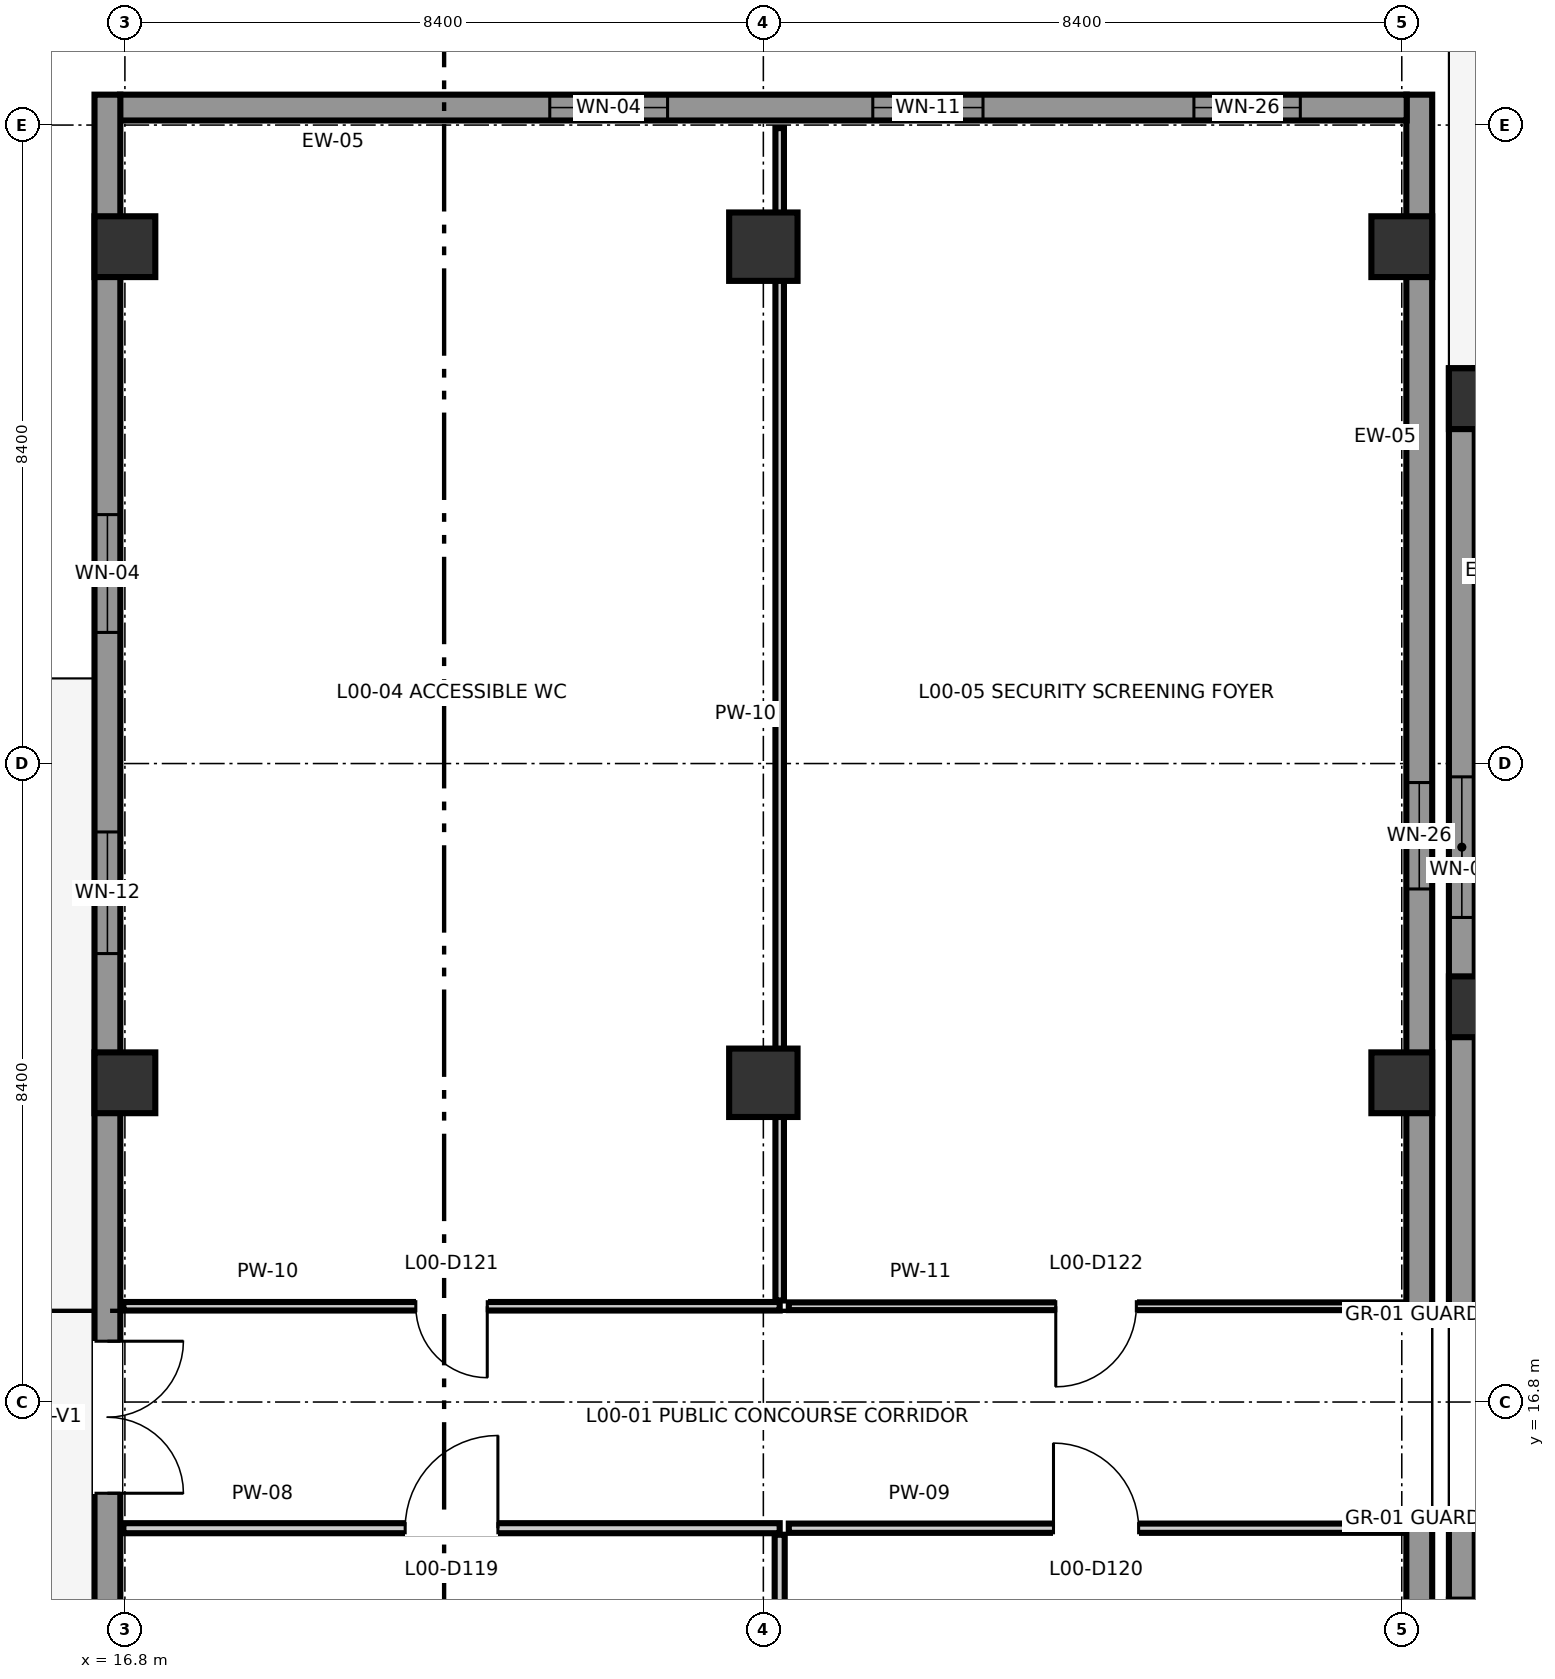
"""IFC4 building model, lengths in metres.
Left out: names, types, materials, properties, quantities, classifications, styles, units other than length and angle.
Written with IfcOpenShell. Run it as: python <this file> out.ifc"""

import sys

from ifc_helpers import new_model, si_unit, direction, frame, frame_2d, origin, origin_2d, place, context, subcontext, project, spatial, rectangle, extrude, element, fill, save


model = new_model("IFC4")
c1 = context("Model", 3, precision=1e-05, world=origin(), true_north=direction((0.0, 1.0)))
c2 = subcontext(c1, "Body", "Model", "MODEL_VIEW")
j1 = project(units=[si_unit("LENGTHUNIT", "METRE"), si_unit("PLANEANGLEUNIT", "RADIAN")], contexts=[c1])
p1 = place(None, origin())
s1 = spatial("IfcSite", under=j1, at=p1, CompositionType="ELEMENT")
p2 = place(p1, origin())
s2 = spatial("IfcBuilding", under=s1, at=p2, CompositionType="ELEMENT")
p3 = place(p2, origin())
s3 = spatial("IfcBuildingStorey", under=s2, at=p3, CompositionType="ELEMENT", Elevation=0.0)
for number, where, z_axis, x_axis in (
    (1, (16.8, 21.0, 0.0), (0.0, 0.0, 1.0), (1.0, 0.0, 0.0)),
    (2, (16.8, 32.0, 0.0), (0.0, 0.0, 1.0), (1.0, 0.0, 0.0)),
):
    element("IfcColumn", number, at=place(p3, frame(where, z_axis=z_axis, x_axis=x_axis)), inside=s3, PredefinedType="COLUMN", context=c2, shape_type="SweptSolid", body=[
        extrude(rectangle(XDim=0.8, YDim=0.8, at=origin_2d()), origin(), (0.0, 0.0, 1.0), 5.4),
    ])
for number, where, z_axis, x_axis in (
    (3, (25.2, 21.0, 0.0), (0.0, 0.0, 1.0), (1.0, 0.0, 0.0)),
    (4, (25.2, 32.0, 0.0), (0.0, 0.0, 1.0), (1.0, 0.0, 0.0)),
):
    element("IfcColumn", number, at=place(p3, frame(where, z_axis=z_axis, x_axis=x_axis)), inside=s3, PredefinedType="COLUMN", context=c2, shape_type="SweptSolid", body=[
        extrude(rectangle(XDim=0.9, YDim=0.9, at=origin_2d()), origin(), (0.0, 0.0, 1.0), 5.4),
    ])
for number, where, z_axis, x_axis in (
    (5, (33.6, 21.0, 0.0), (0.0, 0.0, 1.0), (1.0, 0.0, 0.0)),
    (6, (33.6, 32.0, 0.0), (0.0, 0.0, 1.0), (1.0, 0.0, 0.0)),
    (7, (34.62, 13.8, 0.0), (0.0, 0.0, 1.0), (1.0, 0.0, 0.0)),
    (8, (34.62, 22.0, 0.0), (0.0, 0.0, 1.0), (1.0, 0.0, 0.0)),
    (9, (34.62, 30.0, 0.0), (0.0, 0.0, 1.0), (1.0, 0.0, 0.0)),
):
    element("IfcColumn", number, at=place(p3, frame(where, z_axis=z_axis, x_axis=x_axis)), inside=s3, PredefinedType="COLUMN", context=c2, shape_type="SweptSolid", body=[
        extrude(rectangle(XDim=0.8, YDim=0.8, at=origin_2d()), origin(), (0.0, 0.0, 1.0), 5.4),
    ])
p4 = place(p3, frame((33.83, 8.0, 0.0), z_axis=(0.0, 0.0, 1.0), x_axis=(0.0, 1.0, 0.0)))
e10 = element("IfcWall", 10, at=p4, inside=s3, PredefinedType="SOLIDWALL", context=c2, shape_type="SweptSolid", body=[
    extrude(rectangle(XDim=7.25, YDim=0.34, at=frame_2d((3.625, 0.0))), origin(), (0.0, 0.0, 1.0), 5.1),
])
p5 = place(p3, frame((33.83, 17.95, 0.0), z_axis=(0.0, 0.0, 1.0), x_axis=(0.0, 1.0, 0.0)))
e11 = element("IfcWall", 11, at=p5, inside=s3, PredefinedType="SOLIDWALL", context=c2, shape_type="SweptSolid", body=[
    extrude(rectangle(XDim=16.05, YDim=0.34, at=frame_2d((8.025, 0.0))), origin(), (0.0, 0.0, 1.0), 5.1),
])
p6 = place(p5, frame((5.6, 0.0, 0.72)))
e12 = element("IfcOpeningElement", 12, at=p6, cuts=e11, PredefinedType="OPENING", context=c2, shape_type="SweptSolid", body=[
    extrude(rectangle(XDim=1.4, YDim=2.15, at=frame_2d((0.7, 1.075))), frame((0.0, 0.185, 0.0), z_axis=(0.0, -1.0, 0.0), x_axis=(1.0, 0.0, 0.0)), (0.0, 0.0, 1.0), 0.37),
])
p7 = place(p3, frame((33.665, 33.83, 0.0), z_axis=(0.0, 0.0, 1.0), x_axis=(-1.0, 0.0, 0.0)))
e13 = element("IfcWall", 13, at=p7, inside=s3, PredefinedType="SOLIDWALL", context=c2, shape_type="SweptSolid", body=[
    extrude(rectangle(XDim=16.93, YDim=0.34, at=frame_2d((8.465, 0.0))), origin(), (0.0, 0.0, 1.0), 5.1),
])
p8 = place(p7, frame((1.4, 0.0, 0.72)))
e14 = element("IfcOpeningElement", 14, at=p8, cuts=e13, PredefinedType="OPENING", context=c2, shape_type="SweptSolid", body=[
    extrude(rectangle(XDim=1.4, YDim=2.15, at=frame_2d((0.7, 1.075))), frame((0.0, 0.185, 0.0), z_axis=(0.0, -1.0, 0.0), x_axis=(1.0, 0.0, 0.0)), (0.0, 0.0, 1.0), 0.37),
])
p9 = place(p7, frame((5.575, 0.0, 0.72)))
e15 = element("IfcOpeningElement", 15, at=p9, cuts=e13, PredefinedType="OPENING", context=c2, shape_type="SweptSolid", body=[
    extrude(rectangle(XDim=1.45, YDim=1.75, at=frame_2d((0.725, 0.875))), frame((0.0, 0.185, 0.0), z_axis=(0.0, -1.0, 0.0), x_axis=(1.0, 0.0, 0.0)), (0.0, 0.0, 1.0), 0.37),
])
p10 = place(p7, frame((9.725, 0.0, 0.72)))
e16 = element("IfcOpeningElement", 16, at=p10, cuts=e13, PredefinedType="OPENING", context=c2, shape_type="SweptSolid", body=[
    extrude(rectangle(XDim=1.55, YDim=1.5, at=frame_2d((0.775, 0.75))), frame((0.0, 0.185, 0.0), z_axis=(0.0, -1.0, 0.0), x_axis=(1.0, 0.0, 0.0)), (0.0, 0.0, 1.0), 0.37),
])
p11 = place(p3, frame((16.57, 34.0, 0.0), z_axis=(0.0, 0.0, 1.0), x_axis=(0.0, -1.0, 0.0)))
e17 = element("IfcWall", 17, at=p11, inside=s3, PredefinedType="SOLIDWALL", context=c2, shape_type="SweptSolid", body=[
    extrude(rectangle(XDim=26.0, YDim=0.34, at=frame_2d((13.0, 0.0))), origin(), (0.0, 0.0, 1.0), 5.1),
])
p12 = place(p11, frame((16.4, 0.0, 0.0)))
e18 = element("IfcOpeningElement", 18, at=p12, cuts=e17, PredefinedType="OPENING", context=c2, shape_type="SweptSolid", body=[
    extrude(rectangle(XDim=2.0, YDim=2.42, at=frame_2d((1.0, 1.21))), frame((0.0, 0.185, 0.0), z_axis=(0.0, -1.0, 0.0), x_axis=(1.0, 0.0, 0.0)), (0.0, 0.0, 1.0), 0.37),
])
p13 = place(p11, frame((5.525, 0.0, 0.72)))
e19 = element("IfcOpeningElement", 19, at=p13, cuts=e17, PredefinedType="OPENING", context=c2, shape_type="SweptSolid", body=[
    extrude(rectangle(XDim=1.55, YDim=1.5, at=frame_2d((0.775, 0.75))), frame((0.0, 0.185, 0.0), z_axis=(0.0, -1.0, 0.0), x_axis=(1.0, 0.0, 0.0)), (0.0, 0.0, 1.0), 0.37),
])
p14 = place(p11, frame((9.7, 0.0, 0.72)))
e20 = element("IfcOpeningElement", 20, at=p14, cuts=e17, PredefinedType="OPENING", context=c2, shape_type="SweptSolid", body=[
    extrude(rectangle(XDim=1.6, YDim=1.75, at=frame_2d((0.8, 0.875))), frame((0.0, 0.185, 0.0), z_axis=(0.0, -1.0, 0.0), x_axis=(1.0, 0.0, 0.0)), (0.0, 0.0, 1.0), 0.37),
])
p15 = place(p3, frame((100.865, 30.23, 0.0), z_axis=(0.0, 0.0, 1.0), x_axis=(-1.0, 0.0, 0.0)))
e21 = element("IfcWall", 21, at=p15, inside=s3, PredefinedType="SOLIDWALL", context=c2, shape_type="SweptSolid", body=[
    extrude(rectangle(XDim=66.31, YDim=0.34, at=frame_2d((33.155, 0.0))), origin(), (0.0, 0.0, 1.0), 5.1),
])
p16 = place(p15, frame((15.68, 0.0, 0.0)))
e22 = element("IfcOpeningElement", 22, at=p16, cuts=e21, PredefinedType="OPENING", context=c2, shape_type="SweptSolid", body=[
    extrude(rectangle(XDim=1.85, YDim=2.45, at=frame_2d((0.925, 1.225))), frame((0.0, 0.185, 0.0), z_axis=(0.0, -1.0, 0.0), x_axis=(1.0, 0.0, 0.0)), (0.0, 0.0, 1.0), 0.37),
])
p17 = place(p15, frame((6.23, 0.0, 0.0)))
e23 = element("IfcOpeningElement", 23, at=p17, cuts=e21, PredefinedType="OPENING", context=c2, shape_type="SweptSolid", body=[
    extrude(rectangle(XDim=1.85, YDim=2.45, at=frame_2d((0.925, 1.225))), frame((0.0, 0.185, 0.0), z_axis=(0.0, -1.0, 0.0), x_axis=(1.0, 0.0, 0.0)), (0.0, 0.0, 1.0), 0.37),
])
p18 = place(p15, frame((1.25, 0.0, 0.72)))
e24 = element("IfcOpeningElement", 24, at=p18, cuts=e21, PredefinedType="OPENING", context=c2, shape_type="SweptSolid", body=[
    extrude(rectangle(XDim=1.7, YDim=1.5, at=frame_2d((0.85, 0.75))), frame((0.0, 0.185, 0.0), z_axis=(0.0, -1.0, 0.0), x_axis=(1.0, 0.0, 0.0)), (0.0, 0.0, 1.0), 0.37),
])
p19 = place(p15, frame((30.525, 0.0, 0.72)))
e25 = element("IfcOpeningElement", 25, at=p19, cuts=e21, PredefinedType="OPENING", context=c2, shape_type="SweptSolid", body=[
    extrude(rectangle(XDim=1.95, YDim=1.95, at=frame_2d((0.975, 0.975))), frame((0.0, 0.185, 0.0), z_axis=(0.0, -1.0, 0.0), x_axis=(1.0, 0.0, 0.0)), (0.0, 0.0, 1.0), 0.37),
])
p20 = place(p15, frame((38.875, 0.0, 0.72)))
e26 = element("IfcOpeningElement", 26, at=p20, cuts=e21, PredefinedType="OPENING", context=c2, shape_type="SweptSolid", body=[
    extrude(rectangle(XDim=2.05, YDim=1.75, at=frame_2d((1.025, 0.875))), frame((0.0, 0.185, 0.0), z_axis=(0.0, -1.0, 0.0), x_axis=(1.0, 0.0, 0.0)), (0.0, 0.0, 1.0), 0.37),
])
p21 = place(p15, frame((59.775, 0.0, 0.72)))
e27 = element("IfcOpeningElement", 27, at=p21, cuts=e21, PredefinedType="OPENING", context=c2, shape_type="SweptSolid", body=[
    extrude(rectangle(XDim=2.25, YDim=2.15, at=frame_2d((1.125, 1.075))), frame((0.0, 0.185, 0.0), z_axis=(0.0, -1.0, 0.0), x_axis=(1.0, 0.0, 0.0)), (0.0, 0.0, 1.0), 0.37),
])
p22 = place(p3, frame((34.39, 30.4, 0.0), z_axis=(0.0, 0.0, 1.0), x_axis=(0.0, -1.0, 0.0)))
e28 = element("IfcWall", 28, at=p22, inside=s3, PredefinedType="SOLIDWALL", context=c2, shape_type="SweptSolid", body=[
    extrude(rectangle(XDim=12.45, YDim=0.34, at=frame_2d((6.225, 0.0))), origin(), (0.0, 0.0, 1.0), 5.1),
])
p23 = place(p22, frame((5.375, 0.0, 0.72)))
e29 = element("IfcOpeningElement", 29, at=p23, cuts=e28, PredefinedType="OPENING", context=c2, shape_type="SweptSolid", body=[
    extrude(rectangle(XDim=1.85, YDim=1.5, at=frame_2d((0.925, 0.75))), frame((0.0, 0.185, 0.0), z_axis=(0.0, -1.0, 0.0), x_axis=(1.0, 0.0, 0.0)), (0.0, 0.0, 1.0), 0.37),
])
p24 = place(p3, frame((34.39, 15.25, 0.0), z_axis=(0.0, 0.0, 1.0), x_axis=(0.0, -1.0, 0.0)))
e30 = element("IfcWall", 30, at=p24, inside=s3, PredefinedType="SOLIDWALL", context=c2, shape_type="SweptSolid", body=[
    extrude(rectangle(XDim=10.05, YDim=0.34, at=frame_2d((5.025, 0.0))), origin(), (0.0, 0.0, 1.0), 5.1),
])
p25 = place(p3, frame((16.78, 15.14, 0.0), z_axis=(0.0, 0.0, 1.0), x_axis=(1.0, 0.0, 0.0)))
e31 = element("IfcWall", 31, at=p25, inside=s3, PredefinedType="PARTITIONING", context=c2, shape_type="SweptSolid", body=[
    extrude(rectangle(XDim=8.635, YDim=0.132, at=frame_2d((4.317, 0.0))), origin(), (0.0, 0.0, 1.0), 5.1),
])
p26 = place(p25, frame((3.708, 0.0, 0.0)))
e32 = element("IfcOpeningElement", 32, at=p26, cuts=e31, PredefinedType="OPENING", context=c2, shape_type="SweptSolid", body=[
    extrude(rectangle(XDim=1.22, YDim=2.18, at=frame_2d((0.61, 1.09))), frame((0.0, 0.081, 0.0), z_axis=(0.0, -1.0, 0.0), x_axis=(1.0, 0.0, 0.0)), (0.0, 0.0, 1.0), 0.162),
])
p27 = place(p3, frame((25.415, 8.44, 0.0), z_axis=(0.0, 0.0, 1.0), x_axis=(0.0, 1.0, 0.0)))
e33 = element("IfcWall", 33, at=p27, inside=s3, PredefinedType="PARTITIONING", context=c2, shape_type="SweptSolid", body=[
    extrude(rectangle(XDim=6.614, YDim=0.132, at=frame_2d((3.307, 0.0))), origin(), (0.0, 0.0, 1.0), 4.53),
])
p28 = place(p3, frame((25.535, 15.14, 0.0), z_axis=(0.0, 0.0, 1.0), x_axis=(1.0, 0.0, 0.0)))
e34 = element("IfcWall", 34, at=p28, inside=s3, PredefinedType="PARTITIONING", context=c2, shape_type="SweptSolid", body=[
    extrude(rectangle(XDim=8.085, YDim=0.122, at=frame_2d((4.042, 0.0))), origin(), (0.0, 0.0, 1.0), 5.1),
])
p29 = place(p28, frame((3.482, 0.0, 0.0)))
e35 = element("IfcOpeningElement", 35, at=p29, cuts=e34, PredefinedType="OPENING", context=c2, shape_type="SweptSolid", body=[
    extrude(rectangle(XDim=1.12, YDim=2.14, at=frame_2d((0.56, 1.07))), frame((0.0, 0.076, 0.0), z_axis=(0.0, -1.0, 0.0), x_axis=(1.0, 0.0, 0.0)), (0.0, 0.0, 1.0), 0.152),
])
p30 = place(p3, frame((16.78, 18.06, 0.0), z_axis=(0.0, 0.0, 1.0), x_axis=(1.0, 0.0, 0.0)))
e36 = element("IfcWall", 36, at=p30, inside=s3, PredefinedType="PARTITIONING", context=c2, shape_type="SweptSolid", body=[
    extrude(rectangle(XDim=8.635, YDim=0.112, at=frame_2d((4.317, 0.0))), origin(), (0.0, 0.0, 1.0), 5.1),
])
p31 = place(p30, frame((3.847, 0.0, 0.0)))
e37 = element("IfcOpeningElement", 37, at=p31, cuts=e36, PredefinedType="OPENING", context=c2, shape_type="SweptSolid", body=[
    extrude(rectangle(XDim=0.94, YDim=2.07, at=frame_2d((0.47, 1.035))), frame((0.0, 0.071, 0.0), z_axis=(0.0, -1.0, 0.0), x_axis=(1.0, 0.0, 0.0)), (0.0, 0.0, 1.0), 0.142),
])
p32 = place(p3, frame((25.415, 18.136, 0.0), z_axis=(0.0, 0.0, 1.0), x_axis=(0.0, 1.0, 0.0)))
e38 = element("IfcWall", 38, at=p32, inside=s3, PredefinedType="PARTITIONING", context=c2, shape_type="SweptSolid", body=[
    extrude(rectangle(XDim=15.424, YDim=0.112, at=frame_2d((7.712, 0.0))), origin(), (0.0, 0.0, 1.0), 4.53),
])
p33 = place(p3, frame((25.535, 18.06, 0.0), z_axis=(0.0, 0.0, 1.0), x_axis=(1.0, 0.0, 0.0)))
e39 = element("IfcWall", 39, at=p33, inside=s3, PredefinedType="PARTITIONING", context=c2, shape_type="SweptSolid", body=[
    extrude(rectangle(XDim=8.085, YDim=0.102, at=frame_2d((4.042, 0.0))), origin(), (0.0, 0.0, 1.0), 5.1),
])
p34 = place(p33, frame((3.512, 0.0, 0.0)))
e40 = element("IfcOpeningElement", 40, at=p34, cuts=e39, PredefinedType="OPENING", context=c2, shape_type="SweptSolid", body=[
    extrude(rectangle(XDim=1.06, YDim=2.12, at=frame_2d((0.53, 1.06))), frame((0.0, 0.066, 0.0), z_axis=(0.0, -1.0, 0.0), x_axis=(1.0, 0.0, 0.0)), (0.0, 0.0, 1.0), 0.132),
])
p35 = place(p6, origin())
e41 = element("IfcWindow", 41, at=p35, inside=s3, PartitioningType="SINGLE_PANEL", PredefinedType="WINDOW", context=c2, shape_type="SweptSolid", body=[
    extrude(rectangle(XDim=1.4, YDim=2.15, at=frame_2d((0.7, 1.075))), frame((0.0, 0.03, 0.0), z_axis=(0.0, -1.0, 0.0), x_axis=(1.0, 0.0, 0.0)), (0.0, 0.0, 1.0), 0.06),
])
fill(e12, e41)
p36 = place(p8, origin())
e42 = element("IfcWindow", 42, at=p36, inside=s3, PartitioningType="SINGLE_PANEL", PredefinedType="WINDOW", context=c2, shape_type="SweptSolid", body=[
    extrude(rectangle(XDim=1.4, YDim=2.15, at=frame_2d((0.7, 1.075))), frame((0.0, 0.03, 0.0), z_axis=(0.0, -1.0, 0.0), x_axis=(1.0, 0.0, 0.0)), (0.0, 0.0, 1.0), 0.06),
])
fill(e14, e42)
p37 = place(p9, origin())
e43 = element("IfcWindow", 43, at=p37, inside=s3, PartitioningType="SINGLE_PANEL", PredefinedType="WINDOW", context=c2, shape_type="SweptSolid", body=[
    extrude(rectangle(XDim=1.45, YDim=1.75, at=frame_2d((0.725, 0.875))), frame((0.0, 0.03, 0.0), z_axis=(0.0, -1.0, 0.0), x_axis=(1.0, 0.0, 0.0)), (0.0, 0.0, 1.0), 0.06),
])
fill(e15, e43)
p38 = place(p10, origin())
e44 = element("IfcWindow", 44, at=p38, inside=s3, PartitioningType="SINGLE_PANEL", PredefinedType="WINDOW", context=c2, shape_type="SweptSolid", body=[
    extrude(rectangle(XDim=1.55, YDim=1.5, at=frame_2d((0.775, 0.75))), frame((0.0, 0.03, 0.0), z_axis=(0.0, -1.0, 0.0), x_axis=(1.0, 0.0, 0.0)), (0.0, 0.0, 1.0), 0.06),
])
fill(e16, e44)
p39 = place(p12, frame((2.0, 0.0, 0.0), z_axis=(0.0, 0.0, 1.0), x_axis=(-1.0, 0.0, 0.0)))
e45 = element("IfcDoor", 45, at=p39, inside=s3, OperationType="DOUBLE_DOOR_SINGLE_SWING", PredefinedType="DOOR", context=c2, shape_type="SweptSolid", body=[
    extrude(rectangle(XDim=2.0, YDim=2.42, at=frame_2d((1.0, 1.21))), frame((0.0, 0.025, 0.0), z_axis=(0.0, -1.0, 0.0), x_axis=(1.0, 0.0, 0.0)), (0.0, 0.0, 1.0), 0.05),
])
fill(e18, e45)
p40 = place(p13, origin())
e46 = element("IfcWindow", 46, at=p40, inside=s3, PartitioningType="SINGLE_PANEL", PredefinedType="WINDOW", context=c2, shape_type="SweptSolid", body=[
    extrude(rectangle(XDim=1.55, YDim=1.5, at=frame_2d((0.775, 0.75))), frame((0.0, 0.03, 0.0), z_axis=(0.0, -1.0, 0.0), x_axis=(1.0, 0.0, 0.0)), (0.0, 0.0, 1.0), 0.06),
])
fill(e19, e46)
p41 = place(p14, origin())
e47 = element("IfcWindow", 47, at=p41, inside=s3, PartitioningType="SINGLE_PANEL", PredefinedType="WINDOW", context=c2, shape_type="SweptSolid", body=[
    extrude(rectangle(XDim=1.6, YDim=1.75, at=frame_2d((0.8, 0.875))), frame((0.0, 0.03, 0.0), z_axis=(0.0, -1.0, 0.0), x_axis=(1.0, 0.0, 0.0)), (0.0, 0.0, 1.0), 0.06),
])
fill(e20, e47)
p42 = place(p23, origin())
e48 = element("IfcWindow", 48, at=p42, inside=s3, PartitioningType="SINGLE_PANEL", PredefinedType="WINDOW", context=c2, shape_type="SweptSolid", body=[
    extrude(rectangle(XDim=1.85, YDim=1.5, at=frame_2d((0.925, 0.75))), frame((0.0, 0.03, 0.0), z_axis=(0.0, -1.0, 0.0), x_axis=(1.0, 0.0, 0.0)), (0.0, 0.0, 1.0), 0.06),
])
fill(e29, e48)
p43 = place(p26, frame((1.22, 0.0, 0.0), z_axis=(0.0, 0.0, 1.0), x_axis=(-1.0, 0.0, 0.0)))
e49 = element("IfcDoor", 49, at=p43, inside=s3, OperationType="SINGLE_SWING_RIGHT", PredefinedType="DOOR", context=c2, shape_type="SweptSolid", body=[
    extrude(rectangle(XDim=1.22, YDim=2.18, at=frame_2d((0.61, 1.09))), frame((0.0, 0.025, 0.0), z_axis=(0.0, -1.0, 0.0), x_axis=(1.0, 0.0, 0.0)), (0.0, 0.0, 1.0), 0.05),
])
fill(e32, e49)
p44 = place(p29, frame((1.12, 0.0, 0.0), z_axis=(0.0, 0.0, 1.0), x_axis=(-1.0, 0.0, 0.0)))
e50 = element("IfcDoor", 50, at=p44, inside=s3, OperationType="SINGLE_SWING_LEFT", PredefinedType="DOOR", context=c2, shape_type="SweptSolid", body=[
    extrude(rectangle(XDim=1.12, YDim=2.14, at=frame_2d((0.56, 1.07))), frame((0.0, 0.025, 0.0), z_axis=(0.0, -1.0, 0.0), x_axis=(1.0, 0.0, 0.0)), (0.0, 0.0, 1.0), 0.05),
])
fill(e35, e50)
p45 = place(p31, origin())
e51 = element("IfcDoor", 51, at=p45, inside=s3, OperationType="SINGLE_SWING_RIGHT", PredefinedType="DOOR", context=c2, shape_type="SweptSolid", body=[
    extrude(rectangle(XDim=0.94, YDim=2.07, at=frame_2d((0.47, 1.035))), frame((0.0, 0.025, 0.0), z_axis=(0.0, -1.0, 0.0), x_axis=(1.0, 0.0, 0.0)), (0.0, 0.0, 1.0), 0.05),
])
fill(e37, e51)
p46 = place(p34, origin())
e52 = element("IfcDoor", 52, at=p46, inside=s3, OperationType="SINGLE_SWING_LEFT", PredefinedType="DOOR", context=c2, shape_type="SweptSolid", body=[
    extrude(rectangle(XDim=1.06, YDim=2.12, at=frame_2d((0.53, 1.06))), frame((0.0, 0.025, 0.0), z_axis=(0.0, -1.0, 0.0), x_axis=(1.0, 0.0, 0.0)), (0.0, 0.0, 1.0), 0.05),
])
fill(e40, e52)
save(model, sys.argv[1])
